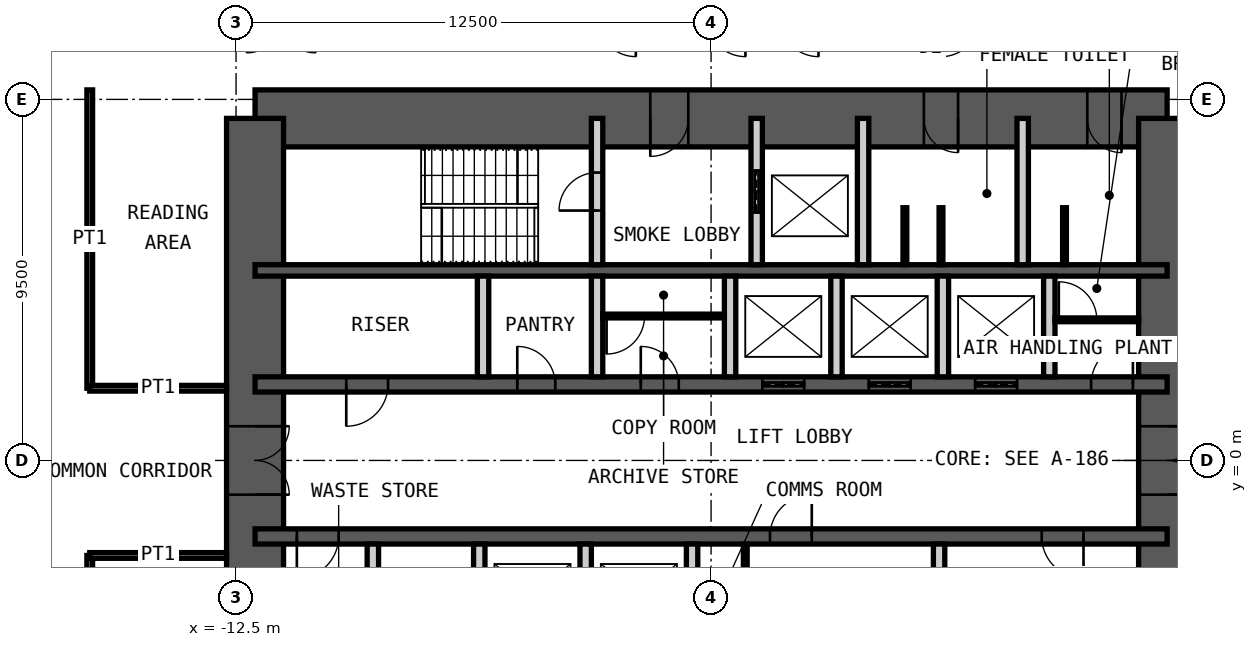
"""IFC4 building model, lengths in metres.
Left out: names, types, materials, properties, quantities, classifications, styles, units other than length and angle.
Written with IfcOpenShell. Run it as: python <this file> out.ifc"""

import sys

from ifc_helpers import new_model, si_unit, direction, frame, frame_2d, origin, place, context, subcontext, project, spatial, rectangle, extrude, element, fill, save


model = new_model("IFC4")
c1 = context("Model", 3, precision=1e-05, world=origin(), true_north=direction((0.0, 1.0)))
c2 = subcontext(c1, "Body", "Model", "MODEL_VIEW")
j1 = project(units=[si_unit("LENGTHUNIT", "METRE"), si_unit("PLANEANGLEUNIT", "RADIAN")], contexts=[c1])
p1 = place(None, origin())
s1 = spatial("IfcSite", under=j1, at=p1, CompositionType="ELEMENT")
p2 = place(p1, origin())
s2 = spatial("IfcBuilding", under=s1, at=p2, CompositionType="ELEMENT")
p3 = place(p2, frame((0.0, 0.0, 107.2)))
s3 = spatial("IfcBuildingStorey", under=s2, at=p3, CompositionType="ELEMENT", Elevation=107.2)
p4 = place(p3, frame((-12.0, 9.0, 0.0), z_axis=(0.0, 0.0, 1.0), x_axis=(1.0, 0.0, 0.0)))
e1 = element("IfcWall", 1, at=p4, inside=s3, PredefinedType="SHEAR", context=c2, shape_type="SweptSolid", body=[
    extrude(rectangle(XDim=24.0, YDim=1.5, at=frame_2d((12.0, 0.0))), origin(), (0.0, 0.0, 1.0), 4.2),
])
p5 = place(p4, frame((10.4, 0.0, 0.0)))
e2 = element("IfcOpeningElement", 2, at=p5, cuts=e1, PredefinedType="OPENING", context=c2, shape_type="SweptSolid", body=[
    extrude(rectangle(XDim=1.0, YDim=2.1, at=frame_2d((0.5, 1.05))), frame((0.0, 0.76, 0.0), z_axis=(0.0, -1.0, 0.0), x_axis=(1.0, 0.0, 0.0)), (0.0, 0.0, 1.0), 1.52),
])
p6 = place(p4, frame((17.6, 0.0, 0.0)))
e3 = element("IfcOpeningElement", 3, at=p6, cuts=e1, PredefinedType="OPENING", context=c2, shape_type="SweptSolid", body=[
    extrude(rectangle(XDim=0.9, YDim=2.1, at=frame_2d((0.45, 1.05))), frame((0.0, 0.76, 0.0), z_axis=(0.0, -1.0, 0.0), x_axis=(1.0, 0.0, 0.0)), (0.0, 0.0, 1.0), 1.52),
])
p7 = place(p4, frame((21.9, 0.0, 0.0)))
e4 = element("IfcOpeningElement", 4, at=p7, cuts=e1, PredefinedType="OPENING", context=c2, shape_type="SweptSolid", body=[
    extrude(rectangle(XDim=0.9, YDim=2.1, at=frame_2d((0.45, 1.05))), frame((0.0, 0.76, 0.0), z_axis=(0.0, -1.0, 0.0), x_axis=(1.0, 0.0, 0.0)), (0.0, 0.0, 1.0), 1.52),
])
p8 = place(p3, frame((12.0, -9.0, 0.0), z_axis=(0.0, 0.0, 1.0), x_axis=(0.0, 1.0, 0.0)))
e5 = element("IfcWall", 5, at=p8, inside=s3, PredefinedType="SHEAR", context=c2, shape_type="SweptSolid", body=[
    extrude(rectangle(XDim=18.0, YDim=1.5, at=frame_2d((9.0, 0.0))), origin(), (0.0, 0.0, 1.0), 4.2),
])
p9 = place(p8, frame((8.1, 0.0, 0.0)))
e6 = element("IfcOpeningElement", 6, at=p9, cuts=e5, PredefinedType="OPENING", context=c2, shape_type="SweptSolid", body=[
    extrude(rectangle(XDim=1.8, YDim=2.1, at=frame_2d((0.9, 1.05))), frame((0.0, 0.76, 0.0), z_axis=(0.0, -1.0, 0.0), x_axis=(1.0, 0.0, 0.0)), (0.0, 0.0, 1.0), 1.52),
])
p10 = place(p3, frame((-12.0, -9.0, 0.0), z_axis=(0.0, 0.0, 1.0), x_axis=(0.0, 1.0, 0.0)))
e7 = element("IfcWall", 7, at=p10, inside=s3, PredefinedType="SHEAR", context=c2, shape_type="SweptSolid", body=[
    extrude(rectangle(XDim=18.0, YDim=1.5, at=frame_2d((9.0, 0.0))), origin(), (0.0, 0.0, 1.0), 4.2),
])
p11 = place(p10, frame((8.1, 0.0, 0.0)))
e8 = element("IfcOpeningElement", 8, at=p11, cuts=e7, PredefinedType="OPENING", context=c2, shape_type="SweptSolid", body=[
    extrude(rectangle(XDim=1.8, YDim=2.1, at=frame_2d((0.9, 1.05))), frame((0.0, 0.76, 0.0), z_axis=(0.0, -1.0, 0.0), x_axis=(1.0, 0.0, 0.0)), (0.0, 0.0, 1.0), 1.52),
])
p12 = place(p3, frame((-12.0, 5.0, 0.0), z_axis=(0.0, 0.0, 1.0), x_axis=(1.0, 0.0, 0.0)))
e9 = element("IfcWall", 9, at=p12, inside=s3, PredefinedType="SHEAR", context=c2, shape_type="SweptSolid", body=[
    extrude(rectangle(XDim=24.0, YDim=0.3, at=frame_2d((12.0, 0.0))), origin(), (0.0, 0.0, 1.0), 4.2),
])
p13 = place(p3, frame((-12.0, 2.0, 0.0), z_axis=(0.0, 0.0, 1.0), x_axis=(1.0, 0.0, 0.0)))
e10 = element("IfcWall", 10, at=p13, inside=s3, PredefinedType="SHEAR", context=c2, shape_type="SweptSolid", body=[
    extrude(rectangle(XDim=24.0, YDim=0.4, at=frame_2d((12.0, 0.0))), origin(), (0.0, 0.0, 1.0), 4.2),
])
p14 = place(p13, frame((2.4, 0.0, 0.0)))
e11 = element("IfcOpeningElement", 11, at=p14, cuts=e10, PredefinedType="OPENING", context=c2, shape_type="SweptSolid", body=[
    extrude(rectangle(XDim=1.1, YDim=2.1, at=frame_2d((0.55, 1.05))), frame((0.0, 0.21, 0.0), z_axis=(0.0, -1.0, 0.0), x_axis=(1.0, 0.0, 0.0)), (0.0, 0.0, 1.0), 0.42),
])
p15 = place(p13, frame((22.0, 0.0, 0.0)))
e12 = element("IfcOpeningElement", 12, at=p15, cuts=e10, PredefinedType="OPENING", context=c2, shape_type="SweptSolid", body=[
    extrude(rectangle(XDim=1.1, YDim=2.1, at=frame_2d((0.55, 1.05))), frame((0.0, 0.21, 0.0), z_axis=(0.0, -1.0, 0.0), x_axis=(1.0, 0.0, 0.0)), (0.0, 0.0, 1.0), 0.42),
])
p16 = place(p13, frame((10.15, 0.0, 0.0)))
e13 = element("IfcOpeningElement", 13, at=p16, cuts=e10, PredefinedType="OPENING", context=c2, shape_type="SweptSolid", body=[
    extrude(rectangle(XDim=1.0, YDim=2.1, at=frame_2d((0.5, 1.05))), frame((0.0, 0.21, 0.0), z_axis=(0.0, -1.0, 0.0), x_axis=(1.0, 0.0, 0.0)), (0.0, 0.0, 1.0), 0.42),
])
p17 = place(p13, frame((6.9, 0.0, 0.0)))
e14 = element("IfcOpeningElement", 14, at=p17, cuts=e10, PredefinedType="OPENING", context=c2, shape_type="SweptSolid", body=[
    extrude(rectangle(XDim=1.0, YDim=2.1, at=frame_2d((0.5, 1.05))), frame((0.0, 0.21, 0.0), z_axis=(0.0, -1.0, 0.0), x_axis=(1.0, 0.0, 0.0)), (0.0, 0.0, 1.0), 0.42),
])
p18 = place(p13, frame((13.35, 0.0, 0.0)))
e15 = element("IfcOpeningElement", 15, at=p18, cuts=e10, PredefinedType="OPENING", context=c2, shape_type="SweptSolid", body=[
    extrude(rectangle(XDim=1.1, YDim=2.4, at=frame_2d((0.55, 1.2))), frame((0.0, 0.21, 0.0), z_axis=(0.0, -1.0, 0.0), x_axis=(1.0, 0.0, 0.0)), (0.0, 0.0, 1.0), 0.42),
])
p19 = place(p13, frame((16.15, 0.0, 0.0)))
e16 = element("IfcOpeningElement", 16, at=p19, cuts=e10, PredefinedType="OPENING", context=c2, shape_type="SweptSolid", body=[
    extrude(rectangle(XDim=1.1, YDim=2.4, at=frame_2d((0.55, 1.2))), frame((0.0, 0.21, 0.0), z_axis=(0.0, -1.0, 0.0), x_axis=(1.0, 0.0, 0.0)), (0.0, 0.0, 1.0), 0.42),
])
p20 = place(p13, frame((18.95, 0.0, 0.0)))
e17 = element("IfcOpeningElement", 17, at=p20, cuts=e10, PredefinedType="OPENING", context=c2, shape_type="SweptSolid", body=[
    extrude(rectangle(XDim=1.1, YDim=2.4, at=frame_2d((0.55, 1.2))), frame((0.0, 0.21, 0.0), z_axis=(0.0, -1.0, 0.0), x_axis=(1.0, 0.0, 0.0)), (0.0, 0.0, 1.0), 0.42),
])
p21 = place(p3, frame((-12.0, -2.0, 0.0), z_axis=(0.0, 0.0, 1.0), x_axis=(1.0, 0.0, 0.0)))
e18 = element("IfcWall", 18, at=p21, inside=s3, PredefinedType="SHEAR", context=c2, shape_type="SweptSolid", body=[
    extrude(rectangle(XDim=24.0, YDim=0.4, at=frame_2d((12.0, 0.0))), origin(), (0.0, 0.0, 1.0), 4.2),
])
p22 = place(p21, frame((1.1, 0.0, 0.0)))
e19 = element("IfcOpeningElement", 19, at=p22, cuts=e18, PredefinedType="OPENING", context=c2, shape_type="SweptSolid", body=[
    extrude(rectangle(XDim=1.1, YDim=2.1, at=frame_2d((0.55, 1.05))), frame((0.0, 0.21, 0.0), z_axis=(0.0, -1.0, 0.0), x_axis=(1.0, 0.0, 0.0)), (0.0, 0.0, 1.0), 0.42),
])
p23 = place(p21, frame((13.55, 0.0, 0.0)))
e20 = element("IfcOpeningElement", 20, at=p23, cuts=e18, PredefinedType="OPENING", context=c2, shape_type="SweptSolid", body=[
    extrude(rectangle(XDim=1.1, YDim=2.1, at=frame_2d((0.55, 1.05))), frame((0.0, 0.21, 0.0), z_axis=(0.0, -1.0, 0.0), x_axis=(1.0, 0.0, 0.0)), (0.0, 0.0, 1.0), 0.42),
])
p24 = place(p21, frame((20.7, 0.0, 0.0)))
e21 = element("IfcOpeningElement", 21, at=p24, cuts=e18, PredefinedType="OPENING", context=c2, shape_type="SweptSolid", body=[
    extrude(rectangle(XDim=1.1, YDim=2.1, at=frame_2d((0.55, 1.05))), frame((0.0, 0.21, 0.0), z_axis=(0.0, -1.0, 0.0), x_axis=(1.0, 0.0, 0.0)), (0.0, 0.0, 1.0), 0.42),
])
p25 = place(p3, frame((-3.0, 5.15, 0.0), z_axis=(0.0, 0.0, 1.0), x_axis=(0.0, 1.0, 0.0)))
e22 = element("IfcWall", 22, at=p25, inside=s3, PredefinedType="PARTITIONING", context=c2, shape_type="SweptSolid", body=[
    extrude(rectangle(XDim=3.85, YDim=0.3, at=frame_2d((1.925, 0.0))), origin(), (0.0, 0.0, 1.0), 3.98),
])
p26 = place(p25, frame((1.425, 0.0, 0.0)))
e23 = element("IfcOpeningElement", 23, at=p26, cuts=e22, PredefinedType="OPENING", context=c2, shape_type="SweptSolid", body=[
    extrude(rectangle(XDim=1.0, YDim=2.1, at=frame_2d((0.5, 1.05))), frame((0.0, 0.16, 0.0), z_axis=(0.0, -1.0, 0.0), x_axis=(1.0, 0.0, 0.0)), (0.0, 0.0, 1.0), 0.32),
])
p27 = place(p3, frame((1.2, 5.15, 0.0), z_axis=(0.0, 0.0, 1.0), x_axis=(0.0, 1.0, 0.0)))
e24 = element("IfcWall", 24, at=p27, inside=s3, PredefinedType="PARTITIONING", context=c2, shape_type="SweptSolid", body=[
    extrude(rectangle(XDim=3.85, YDim=0.3, at=frame_2d((1.925, 0.0))), origin(), (0.0, 0.0, 1.0), 3.98),
])
p28 = place(p27, frame((1.375, 0.0, 0.0)))
e25 = element("IfcOpeningElement", 25, at=p28, cuts=e24, PredefinedType="OPENING", context=c2, shape_type="SweptSolid", body=[
    extrude(rectangle(XDim=1.1, YDim=2.4, at=frame_2d((0.55, 1.2))), frame((0.0, 0.16, 0.0), z_axis=(0.0, -1.0, 0.0), x_axis=(1.0, 0.0, 0.0)), (0.0, 0.0, 1.0), 0.32),
])
for number, where, z_axis, x_axis in (
    (26, (4.0, 5.15, 0.0), (0.0, 0.0, 1.0), (0.0, 1.0, 0.0)),
    (27, (8.2, 5.15, 0.0), (0.0, 0.0, 1.0), (0.0, 1.0, 0.0)),
):
    element("IfcWall", number, at=place(p3, frame(where, z_axis=z_axis, x_axis=x_axis)), inside=s3, PredefinedType="PARTITIONING", context=c2, shape_type="SweptSolid", body=[
        extrude(rectangle(XDim=3.85, YDim=0.3, at=frame_2d((1.925, 0.0))), origin(), (0.0, 0.0, 1.0), 3.98),
    ])
for number, where, z_axis, x_axis in (
    (28, (-6.0, 2.2, 0.0), (0.0, 0.0, 1.0), (0.0, 1.0, 0.0)),
    (29, (-3.0, 2.2, 0.0), (0.0, 0.0, 1.0), (0.0, 1.0, 0.0)),
    (30, (0.5, 2.2, 0.0), (0.0, 0.0, 1.0), (0.0, 1.0, 0.0)),
    (31, (3.3, 2.2, 0.0), (0.0, 0.0, 1.0), (0.0, 1.0, 0.0)),
    (32, (6.1, 2.2, 0.0), (0.0, 0.0, 1.0), (0.0, 1.0, 0.0)),
    (33, (8.9, 2.2, 0.0), (0.0, 0.0, 1.0), (0.0, 1.0, 0.0)),
    (34, (-8.9, -4.85, 0.0), (0.0, 0.0, 1.0), (0.0, 1.0, 0.0)),
    (35, (-6.1, -4.85, 0.0), (0.0, 0.0, 1.0), (0.0, 1.0, 0.0)),
    (36, (-3.3, -4.85, 0.0), (0.0, 0.0, 1.0), (0.0, 1.0, 0.0)),
    (37, (-0.5, -4.85, 0.0), (0.0, 0.0, 1.0), (0.0, 1.0, 0.0)),
    (38, (6.0, -4.85, 0.0), (0.0, 0.0, 1.0), (0.0, 1.0, 0.0)),
):
    element("IfcWall", number, at=place(p3, frame(where, z_axis=z_axis, x_axis=x_axis)), inside=s3, PredefinedType="PARTITIONING", context=c2, shape_type="SweptSolid", body=[
        extrude(rectangle(XDim=2.65, YDim=0.3, at=frame_2d((1.325, 0.0))), origin(), (0.0, 0.0, 1.0), 3.98),
    ])
p29 = place(p3, frame((-2.85, 3.8, 0.0), z_axis=(0.0, 0.0, 1.0), x_axis=(1.0, 0.0, 0.0)))
e39 = element("IfcWall", 39, at=p29, inside=s3, PredefinedType="PARTITIONING", context=c2, shape_type="SweptSolid", body=[
    extrude(rectangle(XDim=3.2, YDim=0.1, at=frame_2d((1.6, 0.0))), origin(), (0.0, 0.0, 1.0), 3.98),
])
p30 = place(p29, frame((0.1, 0.0, 0.0)))
e40 = element("IfcOpeningElement", 40, at=p30, cuts=e39, PredefinedType="OPENING", context=c2, shape_type="SweptSolid", body=[
    extrude(rectangle(XDim=1.0, YDim=2.4, at=frame_2d((0.5, 1.2))), frame((0.0, 0.06, 0.0), z_axis=(0.0, -1.0, 0.0), x_axis=(1.0, 0.0, 0.0)), (0.0, 0.0, 1.0), 0.12),
])
p31 = place(p3, frame((0.9, -4.85, 0.0), z_axis=(0.0, 0.0, 1.0), x_axis=(0.0, 1.0, 0.0)))
e41 = element("IfcWall", 41, at=p31, inside=s3, PredefinedType="PARTITIONING", context=c2, shape_type="SweptSolid", body=[
    extrude(rectangle(XDim=2.65, YDim=0.1, at=frame_2d((1.325, 0.0))), origin(), (0.0, 0.0, 1.0), 3.98),
])
p32 = place(p31, frame((0.1, 0.0, 0.0)))
e42 = element("IfcOpeningElement", 42, at=p32, cuts=e41, PredefinedType="OPENING", context=c2, shape_type="SweptSolid", body=[
    extrude(rectangle(XDim=1.0, YDim=2.4, at=frame_2d((0.5, 1.2))), frame((0.0, 0.06, 0.0), z_axis=(0.0, -1.0, 0.0), x_axis=(1.0, 0.0, 0.0)), (0.0, 0.0, 1.0), 0.12),
])
p33 = place(p3, frame((9.05, 3.7, 0.0), z_axis=(0.0, 0.0, 1.0), x_axis=(1.0, 0.0, 0.0)))
e43 = element("IfcWall", 43, at=p33, inside=s3, PredefinedType="PARTITIONING", context=c2, shape_type="SweptSolid", body=[
    extrude(rectangle(XDim=2.2, YDim=0.1, at=frame_2d((1.1, 0.0))), origin(), (0.0, 0.0, 1.0), 3.98),
])
p34 = place(p33, frame((0.1, 0.0, 0.0)))
e44 = element("IfcOpeningElement", 44, at=p34, cuts=e43, PredefinedType="OPENING", context=c2, shape_type="SweptSolid", body=[
    extrude(rectangle(XDim=1.0, YDim=2.4, at=frame_2d((0.5, 1.2))), frame((0.0, 0.06, 0.0), z_axis=(0.0, -1.0, 0.0), x_axis=(1.0, 0.0, 0.0)), (0.0, 0.0, 1.0), 0.12),
])
for number, where, z_axis, x_axis in (
    (45, (5.1, 5.15, 0.0), (0.0, 0.0, 1.0), (0.0, 1.0, 0.0)),
    (46, (6.05, 5.15, 0.0), (0.0, 0.0, 1.0), (0.0, 1.0, 0.0)),
    (47, (9.3, 5.15, 0.0), (0.0, 0.0, 1.0), (0.0, 1.0, 0.0)),
):
    element("IfcWall", number, at=place(p3, frame(where, z_axis=z_axis, x_axis=x_axis)), inside=s3, PredefinedType="PARTITIONING", context=c2, shape_type="SweptSolid", body=[
        extrude(rectangle(XDim=1.5, YDim=0.1, at=frame_2d((0.75, 0.0))), origin(), (0.0, 0.0, 1.0), 2.1),
    ])
p35 = place(p3, frame((-16.35, 1.9, 0.0), z_axis=(0.0, 0.0, 1.0), x_axis=(0.0, 1.0, 0.0)))
e48 = element("IfcWall", 48, at=p35, inside=s3, PredefinedType="PARTITIONING", context=c2, shape_type="SweptSolid", body=[
    extrude(rectangle(XDim=7.85, YDim=0.15, at=frame_2d((3.925, 0.0))), origin(), (0.0, 0.0, 1.0), 4.03),
])
p36 = place(p3, frame((-12.75, 1.9, 0.0), z_axis=(0.0, 0.0, 1.0), x_axis=(-1.0, 0.0, 0.0)))
e49 = element("IfcWall", 49, at=p36, inside=s3, PredefinedType="PARTITIONING", context=c2, shape_type="SweptSolid", body=[
    extrude(rectangle(XDim=3.6, YDim=0.15, at=frame_2d((1.8, 0.0))), origin(), (0.0, 0.0, 1.0), 3.33),
])
p37 = place(p3, frame((-16.35, -9.75, 0.0), z_axis=(0.0, 0.0, 1.0), x_axis=(0.0, 1.0, 0.0)))
e50 = element("IfcWall", 50, at=p37, inside=s3, PredefinedType="PARTITIONING", context=c2, shape_type="SweptSolid", body=[
    extrude(rectangle(XDim=7.25, YDim=0.15, at=frame_2d((3.625, 0.0))), origin(), (0.0, 0.0, 1.0), 4.03),
])
p38 = place(p3, frame((-12.75, -2.5, 0.0), z_axis=(0.0, 0.0, 1.0), x_axis=(-1.0, 0.0, 0.0)))
e51 = element("IfcWall", 51, at=p38, inside=s3, PredefinedType="PARTITIONING", context=c2, shape_type="SweptSolid", body=[
    extrude(rectangle(XDim=3.6, YDim=0.15, at=frame_2d((1.8, 0.0))), origin(), (0.0, 0.0, 1.0), 3.33),
])
p39 = place(p5, origin())
e52 = element("IfcDoor", 52, at=p39, inside=s3, OperationType="SINGLE_SWING_LEFT", PredefinedType="DOOR", context=c2, shape_type="SweptSolid", body=[
    extrude(rectangle(XDim=1.0, YDim=2.1, at=frame_2d((0.5, 1.05))), frame((0.0, 0.025, 0.0), z_axis=(0.0, -1.0, 0.0), x_axis=(1.0, 0.0, 0.0)), (0.0, 0.0, 1.0), 0.05),
])
fill(e2, e52)
p40 = place(p6, origin())
e53 = element("IfcDoor", 53, at=p40, inside=s3, OperationType="SINGLE_SWING_RIGHT", PredefinedType="DOOR", context=c2, shape_type="SweptSolid", body=[
    extrude(rectangle(XDim=0.9, YDim=2.1, at=frame_2d((0.45, 1.05))), frame((0.0, 0.025, 0.0), z_axis=(0.0, -1.0, 0.0), x_axis=(1.0, 0.0, 0.0)), (0.0, 0.0, 1.0), 0.05),
])
fill(e3, e53)
p41 = place(p7, origin())
e54 = element("IfcDoor", 54, at=p41, inside=s3, OperationType="SINGLE_SWING_RIGHT", PredefinedType="DOOR", context=c2, shape_type="SweptSolid", body=[
    extrude(rectangle(XDim=0.9, YDim=2.1, at=frame_2d((0.45, 1.05))), frame((0.0, 0.025, 0.0), z_axis=(0.0, -1.0, 0.0), x_axis=(1.0, 0.0, 0.0)), (0.0, 0.0, 1.0), 0.05),
])
fill(e4, e54)
p42 = place(p26, origin())
e55 = element("IfcDoor", 55, at=p42, inside=s3, OperationType="SINGLE_SWING_RIGHT", PredefinedType="DOOR", context=c2, shape_type="SweptSolid", body=[
    extrude(rectangle(XDim=1.0, YDim=2.1, at=frame_2d((0.5, 1.05))), frame((0.0, 0.025, 0.0), z_axis=(0.0, -1.0, 0.0), x_axis=(1.0, 0.0, 0.0)), (0.0, 0.0, 1.0), 0.05),
])
fill(e23, e55)
p43 = place(p14, origin())
e56 = element("IfcDoor", 56, at=p43, inside=s3, OperationType="SINGLE_SWING_LEFT", PredefinedType="DOOR", context=c2, shape_type="SweptSolid", body=[
    extrude(rectangle(XDim=1.1, YDim=2.1, at=frame_2d((0.55, 1.05))), frame((0.0, 0.025, 0.0), z_axis=(0.0, -1.0, 0.0), x_axis=(1.0, 0.0, 0.0)), (0.0, 0.0, 1.0), 0.05),
])
fill(e11, e56)
p44 = place(p22, origin())
e57 = element("IfcDoor", 57, at=p44, inside=s3, OperationType="SINGLE_SWING_LEFT", PredefinedType="DOOR", context=c2, shape_type="SweptSolid", body=[
    extrude(rectangle(XDim=1.1, YDim=2.1, at=frame_2d((0.55, 1.05))), frame((0.0, 0.025, 0.0), z_axis=(0.0, -1.0, 0.0), x_axis=(1.0, 0.0, 0.0)), (0.0, 0.0, 1.0), 0.05),
])
fill(e19, e57)
p45 = place(p15, origin())
e58 = element("IfcDoor", 58, at=p45, inside=s3, OperationType="SINGLE_SWING_LEFT", PredefinedType="DOOR", context=c2, shape_type="SweptSolid", body=[
    extrude(rectangle(XDim=1.1, YDim=2.1, at=frame_2d((0.55, 1.05))), frame((0.0, 0.025, 0.0), z_axis=(0.0, -1.0, 0.0), x_axis=(1.0, 0.0, 0.0)), (0.0, 0.0, 1.0), 0.05),
])
fill(e12, e58)
p46 = place(p16, origin())
e59 = element("IfcDoor", 59, at=p46, inside=s3, OperationType="SINGLE_SWING_RIGHT", PredefinedType="DOOR", context=c2, shape_type="SweptSolid", body=[
    extrude(rectangle(XDim=1.0, YDim=2.1, at=frame_2d((0.5, 1.05))), frame((0.0, 0.025, 0.0), z_axis=(0.0, -1.0, 0.0), x_axis=(1.0, 0.0, 0.0)), (0.0, 0.0, 1.0), 0.05),
])
fill(e13, e59)
p47 = place(p23, origin())
e60 = element("IfcDoor", 60, at=p47, inside=s3, OperationType="SINGLE_SWING_LEFT", PredefinedType="DOOR", context=c2, shape_type="SweptSolid", body=[
    extrude(rectangle(XDim=1.1, YDim=2.1, at=frame_2d((0.55, 1.05))), frame((0.0, 0.025, 0.0), z_axis=(0.0, -1.0, 0.0), x_axis=(1.0, 0.0, 0.0)), (0.0, 0.0, 1.0), 0.05),
])
fill(e20, e60)
p48 = place(p24, origin())
e61 = element("IfcDoor", 61, at=p48, inside=s3, OperationType="SINGLE_SWING_RIGHT", PredefinedType="DOOR", context=c2, shape_type="SweptSolid", body=[
    extrude(rectangle(XDim=1.1, YDim=2.1, at=frame_2d((0.55, 1.05))), frame((0.0, 0.025, 0.0), z_axis=(0.0, -1.0, 0.0), x_axis=(1.0, 0.0, 0.0)), (0.0, 0.0, 1.0), 0.05),
])
fill(e21, e61)
p49 = place(p9, origin())
e62 = element("IfcDoor", 62, at=p49, inside=s3, OperationType="DOUBLE_DOOR_DOUBLE_SWING", PredefinedType="DOOR", context=c2, shape_type="SweptSolid", body=[
    extrude(rectangle(XDim=1.8, YDim=2.1, at=frame_2d((0.9, 1.05))), frame((0.0, 0.025, 0.0), z_axis=(0.0, -1.0, 0.0), x_axis=(1.0, 0.0, 0.0)), (0.0, 0.0, 1.0), 0.05),
])
fill(e6, e62)
p50 = place(p11, origin())
e63 = element("IfcDoor", 63, at=p50, inside=s3, OperationType="DOUBLE_DOOR_DOUBLE_SWING", PredefinedType="DOOR", context=c2, shape_type="SweptSolid", body=[
    extrude(rectangle(XDim=1.8, YDim=2.1, at=frame_2d((0.9, 1.05))), frame((0.0, 0.025, 0.0), z_axis=(0.0, -1.0, 0.0), x_axis=(1.0, 0.0, 0.0)), (0.0, 0.0, 1.0), 0.05),
])
fill(e8, e63)
p51 = place(p28, origin())
e64 = element("IfcDoor", 64, at=p51, inside=s3, OperationType="DOUBLE_DOOR_SLIDING", PredefinedType="DOOR", context=c2, shape_type="SweptSolid", body=[
    extrude(rectangle(XDim=1.1, YDim=2.4, at=frame_2d((0.55, 1.2))), frame((0.0, 0.025, 0.0), z_axis=(0.0, -1.0, 0.0), x_axis=(1.0, 0.0, 0.0)), (0.0, 0.0, 1.0), 0.05),
])
fill(e25, e64)
p52 = place(p17, origin())
e65 = element("IfcDoor", 65, at=p52, inside=s3, OperationType="SINGLE_SWING_RIGHT", PredefinedType="DOOR", context=c2, shape_type="SweptSolid", body=[
    extrude(rectangle(XDim=1.0, YDim=2.1, at=frame_2d((0.5, 1.05))), frame((0.0, 0.025, 0.0), z_axis=(0.0, -1.0, 0.0), x_axis=(1.0, 0.0, 0.0)), (0.0, 0.0, 1.0), 0.05),
])
fill(e14, e65)
p53 = place(p18, origin())
e66 = element("IfcDoor", 66, at=p53, inside=s3, OperationType="DOUBLE_DOOR_SLIDING", PredefinedType="DOOR", context=c2, shape_type="SweptSolid", body=[
    extrude(rectangle(XDim=1.1, YDim=2.4, at=frame_2d((0.55, 1.2))), frame((0.0, 0.025, 0.0), z_axis=(0.0, -1.0, 0.0), x_axis=(1.0, 0.0, 0.0)), (0.0, 0.0, 1.0), 0.05),
])
fill(e15, e66)
p54 = place(p19, origin())
e67 = element("IfcDoor", 67, at=p54, inside=s3, OperationType="DOUBLE_DOOR_SLIDING", PredefinedType="DOOR", context=c2, shape_type="SweptSolid", body=[
    extrude(rectangle(XDim=1.1, YDim=2.4, at=frame_2d((0.55, 1.2))), frame((0.0, 0.025, 0.0), z_axis=(0.0, -1.0, 0.0), x_axis=(1.0, 0.0, 0.0)), (0.0, 0.0, 1.0), 0.05),
])
fill(e16, e67)
p55 = place(p20, origin())
e68 = element("IfcDoor", 68, at=p55, inside=s3, OperationType="DOUBLE_DOOR_SLIDING", PredefinedType="DOOR", context=c2, shape_type="SweptSolid", body=[
    extrude(rectangle(XDim=1.1, YDim=2.4, at=frame_2d((0.55, 1.2))), frame((0.0, 0.025, 0.0), z_axis=(0.0, -1.0, 0.0), x_axis=(1.0, 0.0, 0.0)), (0.0, 0.0, 1.0), 0.05),
])
fill(e17, e68)
p56 = place(p30, origin())
e69 = element("IfcDoor", 69, at=p56, inside=s3, OperationType="SINGLE_SWING_LEFT", PredefinedType="DOOR", context=c2, shape_type="SweptSolid", body=[
    extrude(rectangle(XDim=1.0, YDim=2.4, at=frame_2d((0.5, 1.2))), frame((0.0, 0.025, 0.0), z_axis=(0.0, -1.0, 0.0), x_axis=(1.0, 0.0, 0.0)), (0.0, 0.0, 1.0), 0.05),
])
fill(e40, e69)
p57 = place(p34, origin())
e70 = element("IfcDoor", 70, at=p57, inside=s3, OperationType="SINGLE_SWING_RIGHT", PredefinedType="DOOR", context=c2, shape_type="SweptSolid", body=[
    extrude(rectangle(XDim=1.0, YDim=2.4, at=frame_2d((0.5, 1.2))), frame((0.0, 0.025, 0.0), z_axis=(0.0, -1.0, 0.0), x_axis=(1.0, 0.0, 0.0)), (0.0, 0.0, 1.0), 0.05),
])
fill(e44, e70)
save(model, sys.argv[1])
